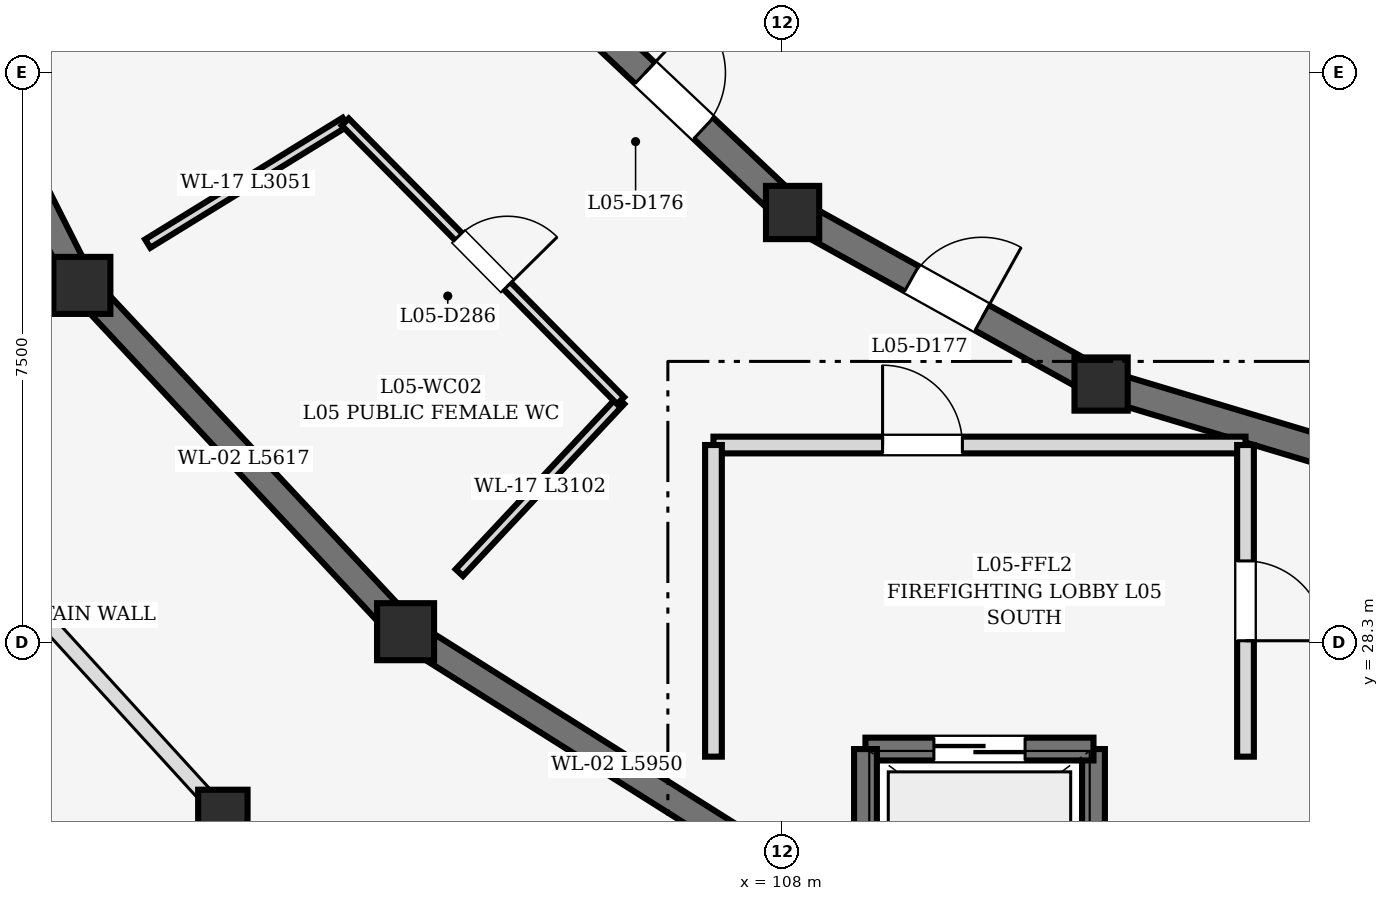
"""IFC4 building model, lengths in metres.
Left out: names, types, materials, properties, quantities, classifications, styles, units other than length and angle.
Written with IfcOpenShell. Run it as: python <this file> out.ifc"""

import sys

from ifc_helpers import new_model, si_unit, direction, frame, frame_2d, origin, origin_2d, place, context, subcontext, project, spatial, rectangle, circle, extrude, element, fill, save


model = new_model("IFC4")
c1 = context("Model", 3, precision=1e-05, world=origin(), true_north=direction((0.0, 1.0)))
c2 = subcontext(c1, "Body", "Model", "MODEL_VIEW")
j1 = project(units=[si_unit("LENGTHUNIT", "METRE"), si_unit("PLANEANGLEUNIT", "RADIAN")], contexts=[c1])
p1 = place(None, origin())
s1 = spatial("IfcSite", under=j1, at=p1, CompositionType="ELEMENT")
p2 = place(p1, origin())
s2 = spatial("IfcBuilding", under=s1, at=p2, CompositionType="ELEMENT")
p3 = place(p2, frame((0.0, 0.0, 19.2)))
s3 = spatial("IfcBuildingStorey", under=s2, at=p3, CompositionType="ELEMENT", Elevation=19.2)
p4 = place(p3, frame((98.79, 33.0, 0.0), z_axis=(0.0, 0.0, 1.0), x_axis=(1.0, 0.0, 0.0)))
e1 = element("IfcColumn", 1, at=p4, inside=s3, PredefinedType="COLUMN", context=c2, shape_type="SweptSolid", body=[
    extrude(circle(Radius=0.375, at=origin_2d()), origin(), (0.0, 0.0, 1.0), 4.5),
])
p5 = place(p3, frame((108.141, 33.959, 0.0), z_axis=(0.0, 0.0, 1.0), x_axis=(1.0, 0.0, 0.0)))
e2 = element("IfcColumn", 2, at=p5, inside=s3, PredefinedType="COLUMN", context=c2, shape_type="SweptSolid", body=[
    extrude(rectangle(XDim=0.7, YDim=0.7, at=origin_2d()), origin(), (0.0, 0.0, 1.0), 4.5),
])
p6 = place(p3, frame((103.049, 28.444, 0.0), z_axis=(0.0, 0.0, 1.0), x_axis=(1.0, 0.0, 0.0)))
e3 = element("IfcColumn", 3, at=p6, inside=s3, PredefinedType="COLUMN", context=c2, shape_type="SweptSolid", body=[
    extrude(circle(Radius=0.375, at=origin_2d()), origin(), (0.0, 0.0, 1.0), 4.5),
])
p7 = place(p3, frame((100.645, 26.04, 0.0), z_axis=(0.0, 0.0, 1.0), x_axis=(1.0, 0.0, 0.0)))
e4 = element("IfcColumn", 4, at=p7, inside=s3, PredefinedType="COLUMN", context=c2, shape_type="SweptSolid", body=[
    extrude(circle(Radius=0.325, at=origin_2d()), origin(), (0.0, 0.0, 1.0), 4.5),
])
p8 = place(p3, frame((112.2, 31.702, 0.0), z_axis=(0.0, 0.0, 1.0), x_axis=(1.0, 0.0, 0.0)))
e5 = element("IfcColumn", 5, at=p8, inside=s3, PredefinedType="COLUMN", context=c2, shape_type="SweptSolid", body=[
    extrude(rectangle(XDim=0.7, YDim=0.7, at=origin_2d()), origin(), (0.0, 0.0, 1.0), 4.5),
])
p9 = place(p3, frame((96.253, 38.029, 0.0), z_axis=(0.0, 0.0, 1.0), x_axis=(0.450512686904, -0.892770025784, 0.0)))
e6 = element("IfcWall", 6, at=p9, inside=s3, PredefinedType="SHEAR", context=c2, shape_type="SweptSolid", body=[
    extrude(rectangle(XDim=5.323, YDim=0.35, at=frame_2d((2.662, 0.0))), origin(), (0.0, 0.0, 1.0), 4.23),
])
p10 = place(p3, frame((105.233, 36.704, 0.0), z_axis=(0.0, 0.0, 1.0), x_axis=(0.727127996206, -0.686501913423, 0.0)))
e7 = element("IfcWall", 7, at=p10, inside=s3, PredefinedType="SOLIDWALL", context=c2, shape_type="SweptSolid", body=[
    extrude(rectangle(XDim=3.714, YDim=0.38, at=frame_2d((1.857, 0.0))), origin(), (0.0, 0.0, 1.0), 4.25),
])
p11 = place(p10, frame((1.327, 0.0, 0.0)))
e8 = element("IfcOpeningElement", 8, at=p11, cuts=e7, PredefinedType="OPENING", context=c2, shape_type="SweptSolid", body=[
    extrude(rectangle(XDim=1.06, YDim=2.24, at=frame_2d((0.53, 1.12))), frame((0.0, 0.202, 0.0), z_axis=(0.0, -1.0, 0.0), x_axis=(1.0, 0.0, 0.0)), (0.0, 0.0, 1.0), 0.404),
])
p12 = place(p3, frame((99.002, 32.773, 0.0), z_axis=(0.0, 0.0, 1.0), x_axis=(0.682886399388, -0.730524582427, 0.0)))
e9 = element("IfcWall", 9, at=p12, inside=s3, PredefinedType="SHEAR", context=c2, shape_type="SweptSolid", body=[
    extrude(rectangle(XDim=5.617, YDim=0.35, at=frame_2d((2.809, 0.0))), origin(), (0.0, 0.0, 1.0), 4.23),
])
p13 = place(p3, frame((108.39, 33.821, 0.0), z_axis=(0.0, 0.0, 1.0), x_axis=(0.87401308715, -0.485902380618, 0.0)))
e10 = element("IfcWall", 10, at=p13, inside=s3, PredefinedType="SOLIDWALL", context=c2, shape_type="SweptSolid", body=[
    extrude(rectangle(XDim=4.074, YDim=0.38, at=frame_2d((2.037, 0.0))), origin(), (0.0, 0.0, 1.0), 4.25),
])
p14 = place(p13, frame((1.507, 0.0, 0.0)))
e11 = element("IfcOpeningElement", 11, at=p14, cuts=e10, PredefinedType="OPENING", context=c2, shape_type="SweptSolid", body=[
    extrude(rectangle(XDim=1.06, YDim=2.24, at=frame_2d((0.53, 1.12))), frame((0.0, 0.202, 0.0), z_axis=(0.0, -1.0, 0.0), x_axis=(1.0, 0.0, 0.0)), (0.0, 0.0, 1.0), 0.404),
])
p15 = place(p3, frame((103.312, 28.279, 0.0), z_axis=(0.0, 0.0, 1.0), x_axis=(0.846132783073, -0.532972150688, 0.0)))
e12 = element("IfcWall", 12, at=p15, inside=s3, PredefinedType="SHEAR", context=c2, shape_type="SweptSolid", body=[
    extrude(rectangle(XDim=5.95, YDim=0.35, at=frame_2d((2.975, 0.0))), origin(), (0.0, 0.0, 1.0), 4.23),
])
p16 = place(p3, frame((112.473, 31.621, 0.0), z_axis=(0.0, 0.0, 1.0), x_axis=(0.957792414988, -0.287460762177, 0.0)))
e13 = element("IfcWall", 13, at=p16, inside=s3, PredefinedType="SOLIDWALL", context=c2, shape_type="SweptSolid", body=[
    extrude(rectangle(XDim=4.365, YDim=0.38, at=frame_2d((2.183, 0.0))), origin(), (0.0, 0.0, 1.0), 4.25),
])
p17 = place(p3, frame((112.1, 26.9, 0.0), z_axis=(0.0, 0.0, 1.0), x_axis=(0.0, -1.0, 0.0)))
e14 = element("IfcWall", 14, at=p17, inside=s3, PredefinedType="SHEAR", context=c2, shape_type="SweptSolid", body=[
    extrude(rectangle(XDim=2.2, YDim=0.3, at=frame_2d((1.1, 0.0))), origin(), (0.0, 0.0, 1.0), 4.28),
])
p18 = place(p3, frame((109.1, 26.9, 0.0), z_axis=(0.0, 0.0, 1.0), x_axis=(1.0, 0.0, 0.0)))
e15 = element("IfcWall", 15, at=p18, inside=s3, PredefinedType="SHEAR", context=c2, shape_type="SweptSolid", body=[
    extrude(rectangle(XDim=3.0, YDim=0.3, at=frame_2d((1.5, 0.0))), origin(), (0.0, 0.0, 1.0), 4.28),
])
p19 = place(p18, frame((0.9, 0.0, 0.0)))
e16 = element("IfcOpeningElement", 16, at=p19, cuts=e15, PredefinedType="OPENING", context=c2, shape_type="SweptSolid", body=[
    extrude(rectangle(XDim=1.2, YDim=2.15, at=frame_2d((0.6, 1.075))), frame((0.0, 0.162, 0.0), z_axis=(0.0, -1.0, 0.0), x_axis=(1.0, 0.0, 0.0)), (0.0, 0.0, 1.0), 0.324),
])
p20 = place(p3, frame((109.1, 24.7, 0.0), z_axis=(0.0, 0.0, 1.0), x_axis=(0.0, 1.0, 0.0)))
e17 = element("IfcWall", 17, at=p20, inside=s3, PredefinedType="SHEAR", context=c2, shape_type="SweptSolid", body=[
    extrude(rectangle(XDim=2.2, YDim=0.3, at=frame_2d((1.1, 0.0))), origin(), (0.0, 0.0, 1.0), 4.23),
])
p21 = place(p3, frame((107.1, 30.9, 0.0), z_axis=(0.0, 0.0, 1.0), x_axis=(1.0, 0.0, 0.0)))
e18 = element("IfcWall", 18, at=p21, inside=s3, PredefinedType="SOLIDWALL", context=c2, shape_type="SweptSolid", body=[
    extrude(rectangle(XDim=7.0, YDim=0.22, at=frame_2d((3.5, 0.0))), origin(), (0.0, 0.0, 1.0), 4.265),
])
p22 = place(p21, frame((2.225, 0.0, 0.0)))
e19 = element("IfcOpeningElement", 19, at=p22, cuts=e18, PredefinedType="OPENING", context=c2, shape_type="SweptSolid", body=[
    extrude(rectangle(XDim=1.05, YDim=2.15, at=frame_2d((0.525, 1.075))), frame((0.0, 0.122, 0.0), z_axis=(0.0, -1.0, 0.0), x_axis=(1.0, 0.0, 0.0)), (0.0, 0.0, 1.0), 0.244),
])
p23 = place(p3, frame((107.1, 26.8, 0.0), z_axis=(0.0, 0.0, 1.0), x_axis=(0.0, 1.0, 0.0)))
e20 = element("IfcWall", 20, at=p23, inside=s3, PredefinedType="SOLIDWALL", context=c2, shape_type="SweptSolid", body=[
    extrude(rectangle(XDim=4.1, YDim=0.22, at=frame_2d((2.05, 0.0))), origin(), (0.0, 0.0, 1.0), 4.265),
])
p24 = place(p3, frame((114.1, 30.9, 0.0), z_axis=(0.0, 0.0, 1.0), x_axis=(0.0, -1.0, 0.0)))
e21 = element("IfcWall", 21, at=p24, inside=s3, PredefinedType="SOLIDWALL", context=c2, shape_type="SweptSolid", body=[
    extrude(rectangle(XDim=4.1, YDim=0.22, at=frame_2d((2.05, 0.0))), origin(), (0.0, 0.0, 1.0), 4.265),
])
p25 = place(p24, frame((1.525, 0.0, 0.0)))
e22 = element("IfcOpeningElement", 22, at=p25, cuts=e21, PredefinedType="OPENING", context=c2, shape_type="SweptSolid", body=[
    extrude(rectangle(XDim=1.05, YDim=2.15, at=frame_2d((0.525, 1.075))), frame((0.0, 0.122, 0.0), z_axis=(0.0, -1.0, 0.0), x_axis=(1.0, 0.0, 0.0)), (0.0, 0.0, 1.0), 0.244),
])
p26 = place(p3, frame((102.255, 35.15, 0.0), z_axis=(0.0, 0.0, 1.0), x_axis=(-0.85151267833, -0.524334014386, 0.0)))
e23 = element("IfcWall", 23, at=p26, inside=s3, PredefinedType="PARTITIONING", context=c2, shape_type="SweptSolid", body=[
    extrude(rectangle(XDim=3.051, YDim=0.13, at=frame_2d((1.526, 0.0))), origin(), (0.0, 0.0, 1.0), 3.734),
])
p27 = place(p3, frame((105.878, 31.484, 0.0), z_axis=(0.0, 0.0, 1.0), x_axis=(-0.683951602278, -0.72952738519, 0.0)))
e24 = element("IfcWall", 24, at=p27, inside=s3, PredefinedType="PARTITIONING", context=c2, shape_type="SweptSolid", body=[
    extrude(rectangle(XDim=3.102, YDim=0.13, at=frame_2d((1.551, 0.0))), origin(), (0.0, 0.0, 1.0), 3.734),
])
p28 = place(p3, frame((102.255, 35.15, 0.0), z_axis=(0.0, 0.0, 1.0), x_axis=(0.702973842803, -0.711215703099, 0.0)))
e25 = element("IfcWall", 25, at=p28, inside=s3, PredefinedType="PARTITIONING", context=c2, shape_type="SweptSolid", body=[
    extrude(rectangle(XDim=5.154, YDim=0.13, at=frame_2d((2.577, 0.0))), origin(), (0.0, 0.0, 1.0), 4.265),
])
p29 = place(p28, frame((2.117, 0.0, 0.0)))
e26 = element("IfcOpeningElement", 26, at=p29, cuts=e25, PredefinedType="OPENING", context=c2, shape_type="SweptSolid", body=[
    extrude(rectangle(XDim=0.92, YDim=2.1, at=frame_2d((0.46, 1.05))), frame((0.0, 0.077, 0.0), z_axis=(0.0, -1.0, 0.0), x_axis=(1.0, 0.0, 0.0)), (0.0, 0.0, 1.0), 0.154),
])
p30 = place(p19, origin())
e27 = element("IfcDoor", 27, at=p30, inside=s3, OperationType="DOUBLE_DOOR_SLIDING", PredefinedType="DOOR", context=c2, shape_type="SweptSolid", body=[
    extrude(rectangle(XDim=1.2, YDim=2.15, at=frame_2d((0.6, 1.075))), frame((0.0, 0.025, 0.0), z_axis=(0.0, -1.0, 0.0), x_axis=(1.0, 0.0, 0.0)), (0.0, 0.0, 1.0), 0.05),
])
fill(e16, e27)
p31 = place(p22, origin())
e28 = element("IfcDoor", 28, at=p31, inside=s3, OperationType="SINGLE_SWING_LEFT", PredefinedType="DOOR", context=c2, shape_type="SweptSolid", body=[
    extrude(rectangle(XDim=1.05, YDim=2.15, at=frame_2d((0.525, 1.075))), frame((0.0, 0.025, 0.0), z_axis=(0.0, -1.0, 0.0), x_axis=(1.0, 0.0, 0.0)), (0.0, 0.0, 1.0), 0.05),
])
fill(e19, e28)
p32 = place(p25, origin())
e29 = element("IfcDoor", 29, at=p32, inside=s3, OperationType="SINGLE_SWING_RIGHT", PredefinedType="DOOR", context=c2, shape_type="SweptSolid", body=[
    extrude(rectangle(XDim=1.05, YDim=2.15, at=frame_2d((0.525, 1.075))), frame((0.0, 0.025, 0.0), z_axis=(0.0, -1.0, 0.0), x_axis=(1.0, 0.0, 0.0)), (0.0, 0.0, 1.0), 0.05),
])
fill(e22, e29)
p33 = place(p11, origin())
e30 = element("IfcDoor", 30, at=p33, inside=s3, OperationType="SINGLE_SWING_LEFT", PredefinedType="DOOR", context=c2, shape_type="SweptSolid", body=[
    extrude(rectangle(XDim=1.06, YDim=2.24, at=frame_2d((0.53, 1.12))), frame((0.0, 0.025, 0.0), z_axis=(0.0, -1.0, 0.0), x_axis=(1.0, 0.0, 0.0)), (0.0, 0.0, 1.0), 0.05),
])
fill(e8, e30)
p34 = place(p14, origin())
e31 = element("IfcDoor", 31, at=p34, inside=s3, OperationType="SINGLE_SWING_RIGHT", PredefinedType="DOOR", context=c2, shape_type="SweptSolid", body=[
    extrude(rectangle(XDim=1.06, YDim=2.24, at=frame_2d((0.53, 1.12))), frame((0.0, 0.025, 0.0), z_axis=(0.0, -1.0, 0.0), x_axis=(1.0, 0.0, 0.0)), (0.0, 0.0, 1.0), 0.05),
])
fill(e11, e31)
p35 = place(p29, origin())
e32 = element("IfcDoor", 32, at=p35, inside=s3, OperationType="SINGLE_SWING_RIGHT", PredefinedType="DOOR", context=c2, shape_type="SweptSolid", body=[
    extrude(rectangle(XDim=0.92, YDim=2.1, at=frame_2d((0.46, 1.05))), frame((0.0, 0.025, 0.0), z_axis=(0.0, -1.0, 0.0), x_axis=(1.0, 0.0, 0.0)), (0.0, 0.0, 1.0), 0.05),
])
fill(e26, e32)
save(model, sys.argv[1])
